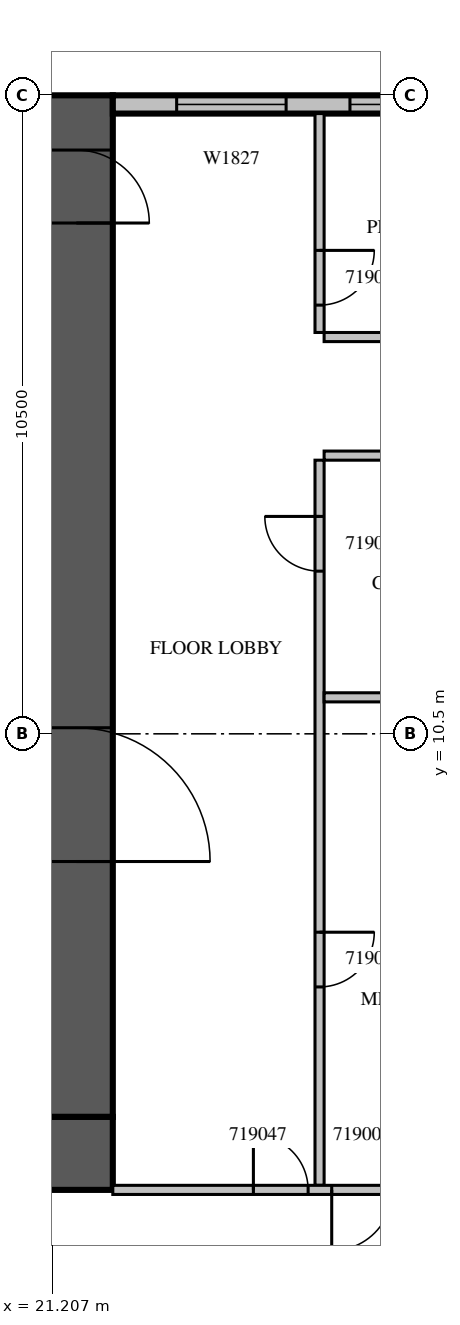
"""IFC4 building model, lengths in metres.
Left out: names, types, materials, properties, quantities, classifications, styles, units other than length and angle.
Written with IfcOpenShell. Run it as: python <this file> out.ifc"""

import sys

from ifc_helpers import new_model, si_unit, direction, frame, frame_2d, origin, place, context, subcontext, project, spatial, rectangle, extrude, source, transform, mapped, element, fill, save


model = new_model("IFC4")
c1 = context("Model", 3, precision=1e-05, world=origin(), true_north=direction((0.0, 1.0)))
c2 = subcontext(c1, "Body", "Model", "MODEL_VIEW")
j1 = project(units=[si_unit("LENGTHUNIT", "METRE"), si_unit("PLANEANGLEUNIT", "RADIAN")], contexts=[c1])
p1 = place(None, origin())
s1 = spatial("IfcSite", under=j1, at=p1, CompositionType="ELEMENT")
p2 = place(p1, origin())
s2 = spatial("IfcBuilding", under=s1, at=p2, CompositionType="ELEMENT")
p3 = place(p2, frame((0.0, 0.0, 90.9)))
s3 = spatial("IfcBuildingStorey", under=s2, at=p3, CompositionType="ELEMENT", Elevation=90.9)
m1 = source(origin(), c2, "Body", "SweptSolid", [
    extrude(rectangle(XDim=16.8, YDim=1.2, at=frame_2d((8.4, 0.0))), origin(), (0.0, 0.0, 1.0), 4.2),
])
p4 = place(p3, frame((21.6, 4.2, 0.0), z_axis=(0.0, 0.0, 1.0), x_axis=(0.0, 1.0, 0.0)))
e1 = element("IfcWall", 1, at=p4, inside=s3, PredefinedType="SHEAR", context=c2, shape_type="MappedRepresentation", body=[
    mapped(m1, transform((0.0, 0.0, 0.0), scale=1.0)),
])
m2 = source(origin(), c2, "Body", "SweptSolid", [
    extrude(rectangle(XDim=2.2, YDim=2.1, at=frame_2d((1.1, 1.05))), frame((0.0, 0.61, 0.0), z_axis=(0.0, -1.0, 0.0), x_axis=(1.0, 0.0, 0.0)), (0.0, 0.0, 1.0), 1.22),
])
p5 = place(p4, frame((4.2, 0.0, 0.0)))
e2 = element("IfcOpeningElement", 2, at=p5, cuts=e1, PredefinedType="OPENING", context=c2, shape_type="MappedRepresentation", body=[
    mapped(m2, transform((0.0, 0.0, 0.0), scale=1.0)),
])
m3 = source(origin(), c2, "Body", "SweptSolid", [
    extrude(rectangle(XDim=1.2, YDim=2.1, at=frame_2d((0.6, 1.05))), frame((0.0, 0.61, 0.0), z_axis=(0.0, -1.0, 0.0), x_axis=(1.0, 0.0, 0.0)), (0.0, 0.0, 1.0), 1.22),
])
p6 = place(p4, frame((14.7, 0.0, 0.0)))
e3 = element("IfcOpeningElement", 3, at=p6, cuts=e1, PredefinedType="OPENING", context=c2, shape_type="MappedRepresentation", body=[
    mapped(m3, transform((0.0, 0.0, 0.0), scale=1.0)),
])
m4 = source(origin(), c2, "Body", "SweptSolid", [
    extrude(rectangle(XDim=18.0, YDim=1.2, at=frame_2d((9.0, 0.0))), origin(), (0.0, 0.0, 1.0), 4.2),
])
p7 = place(p3, frame((4.2, 3.6, 0.0), z_axis=(0.0, 0.0, 1.0), x_axis=(1.0, 0.0, 0.0)))
e4 = element("IfcWall", 4, at=p7, inside=s3, PredefinedType="SHEAR", context=c2, shape_type="MappedRepresentation", body=[
    mapped(m4, transform((0.0, 0.0, 0.0), scale=1.0)),
])
m5 = source(origin(), c2, "Body", "SweptSolid", [
    extrude(rectangle(XDim=6.6, YDim=0.3, at=frame_2d((3.3, 0.0))), origin(), (0.0, 0.0, 1.0), 3.8),
])
p8 = place(p3, frame((28.8, 20.85, 0.0), z_axis=(0.0, 0.0, 1.0), x_axis=(-1.0, 0.0, 0.0)))
e5 = element("IfcWall", 5, at=p8, inside=s3, PredefinedType="STANDARD", context=c2, shape_type="MappedRepresentation", body=[
    mapped(m5, transform((0.0, 0.0, 0.0), scale=1.0)),
])
m6 = source(origin(), c2, "Body", "SweptSolid", [
    extrude(rectangle(XDim=2.4, YDim=2.7, at=frame_2d((1.2, 1.35))), frame((0.0, 0.16, 0.0), z_axis=(0.0, -1.0, 0.0), x_axis=(1.0, 0.0, 0.0)), (0.0, 0.0, 1.0), 0.32),
])
p9 = place(p8, frame((0.3, 0.0, 0.6)))
e6 = element("IfcOpeningElement", 6, at=p9, cuts=e5, PredefinedType="OPENING", context=c2, shape_type="MappedRepresentation", body=[
    mapped(m6, transform((0.0, 0.0, 0.0), scale=1.0)),
])
m7 = source(origin(), c2, "Body", "SweptSolid", [
    extrude(rectangle(XDim=1.8, YDim=2.7, at=frame_2d((0.9, 1.35))), frame((0.0, 0.16, 0.0), z_axis=(0.0, -1.0, 0.0), x_axis=(1.0, 0.0, 0.0)), (0.0, 0.0, 1.0), 0.32),
])
p10 = place(p8, frame((3.75, 0.0, 0.6)))
e7 = element("IfcOpeningElement", 7, at=p10, cuts=e5, PredefinedType="OPENING", context=c2, shape_type="MappedRepresentation", body=[
    mapped(m7, transform((0.0, 0.0, 0.0), scale=1.0)),
])
m8 = source(origin(), c2, "Body", "SweptSolid", [
    extrude(rectangle(XDim=11.925, YDim=0.15, at=frame_2d((5.963, 0.0))), origin(), (0.0, 0.0, 1.0), 3.8),
])
p11 = place(p3, frame((25.6, 15.0, 0.0), z_axis=(0.0, 0.0, 1.0), x_axis=(0.0, -1.0, 0.0)))
e8 = element("IfcWall", 8, at=p11, inside=s3, PredefinedType="PARTITIONING", context=c2, shape_type="MappedRepresentation", body=[
    mapped(m8, transform((0.0, 0.0, 0.0), scale=1.0)),
])
m9 = source(origin(), c2, "Body", "SweptSolid", [
    extrude(rectangle(XDim=0.9, YDim=2.1, at=frame_2d((0.45, 1.05))), frame((0.0, 0.085, 0.0), z_axis=(0.0, -1.0, 0.0), x_axis=(1.0, 0.0, 0.0)), (0.0, 0.0, 1.0), 0.17),
])
p12 = place(p11, frame((7.763, 0.0, 0.0)))
e9 = element("IfcOpeningElement", 9, at=p12, cuts=e8, PredefinedType="OPENING", context=c2, shape_type="MappedRepresentation", body=[
    mapped(m9, transform((0.0, 0.0, 0.0), scale=1.0)),
])
p13 = place(p11, frame((0.925, 0.0, 0.0)))
e10 = element("IfcOpeningElement", 10, at=p13, cuts=e8, PredefinedType="OPENING", context=c2, shape_type="MappedRepresentation", body=[
    mapped(m9, transform((0.0, 0.0, 0.0), scale=1.0)),
])
m10 = source(origin(), c2, "Body", "SweptSolid", [
    extrude(rectangle(XDim=3.6, YDim=0.15, at=frame_2d((1.8, 0.0))), origin(), (0.0, 0.0, 1.0), 3.8),
])
p14 = place(p3, frame((25.6, 20.7, 0.0), z_axis=(0.0, 0.0, 1.0), x_axis=(0.0, -1.0, 0.0)))
e11 = element("IfcWall", 11, at=p14, inside=s3, PredefinedType="PARTITIONING", context=c2, shape_type="MappedRepresentation", body=[
    mapped(m10, transform((0.0, 0.0, 0.0), scale=1.0)),
])
p15 = place(p14, frame((2.25, 0.0, 0.0)))
e12 = element("IfcOpeningElement", 12, at=p15, cuts=e11, PredefinedType="OPENING", context=c2, shape_type="MappedRepresentation", body=[
    mapped(m9, transform((0.0, 0.0, 0.0), scale=1.0)),
])
p16 = place(p3, frame((29.325, 11.1, 0.0), z_axis=(0.0, 0.0, 1.0), x_axis=(-1.0, 0.0, 0.0)))
e13 = element("IfcWall", 13, at=p16, inside=s3, PredefinedType="PARTITIONING", context=c2, shape_type="SweptSolid", body=[
    extrude(rectangle(XDim=3.65, YDim=0.15, at=frame_2d((1.825, 0.0))), origin(), (0.0, 0.0, 1.0), 3.8),
])
m11 = source(origin(), c2, "Body", "SweptSolid", [
    extrude(rectangle(XDim=3.65, YDim=0.15, at=frame_2d((1.825, 0.0))), origin(), (0.0, 0.0, 1.0), 3.8),
])
for number, where, z_axis, x_axis in (
    (14, (29.325, 15.075, 0.0), (0.0, 0.0, 1.0), (-1.0, 0.0, 0.0)),
    (15, (25.675, 17.025, 0.0), (0.0, 0.0, 1.0), (1.0, 0.0, 0.0)),
):
    element("IfcWall", number, at=place(p3, frame(where, z_axis=z_axis, x_axis=x_axis)), inside=s3, PredefinedType="PARTITIONING", context=c2, shape_type="MappedRepresentation", body=[
        mapped(m11, transform((0.0, 0.0, 0.0), scale=1.0)),
    ])
m12 = source(origin(), c2, "Body", "SweptSolid", [
    extrude(rectangle(XDim=7.125, YDim=0.15, at=frame_2d((3.562, 0.0))), origin(), (0.0, 0.0, 1.0), 3.8),
])
p17 = place(p3, frame((22.2, 3.0, 0.0), z_axis=(0.0, 0.0, 1.0), x_axis=(1.0, 0.0, 0.0)))
e16 = element("IfcWall", 16, at=p17, inside=s3, PredefinedType="PARTITIONING", context=c2, shape_type="MappedRepresentation", body=[
    mapped(m12, transform((0.0, 0.0, 0.0), scale=1.0)),
])
m13 = source(origin(), c2, "Body", "SweptSolid", [
    extrude(rectangle(XDim=1.0, YDim=2.1, at=frame_2d((0.5, 1.05))), frame((0.0, 0.085, 0.0), z_axis=(0.0, -1.0, 0.0), x_axis=(1.0, 0.0, 0.0)), (0.0, 0.0, 1.0), 0.17),
])
p18 = place(p17, frame((3.6, 0.0, 0.0)))
e17 = element("IfcOpeningElement", 17, at=p18, cuts=e16, PredefinedType="OPENING", context=c2, shape_type="MappedRepresentation", body=[
    mapped(m13, transform((0.0, 0.0, 0.0), scale=1.0)),
])
p19 = place(p17, frame((2.312, 0.0, 0.0)))
e18 = element("IfcOpeningElement", 18, at=p19, cuts=e16, PredefinedType="OPENING", context=c2, shape_type="MappedRepresentation", body=[
    mapped(m9, transform((0.0, 0.0, 0.0), scale=1.0)),
])
m14 = source(origin(), c2, "Body", "SweptSolid", [
    extrude(rectangle(XDim=2.4, YDim=2.7, at=frame_2d((1.2, 1.35))), frame((0.0, 0.03, 0.0), z_axis=(0.0, -1.0, 0.0), x_axis=(1.0, 0.0, 0.0)), (0.0, 0.0, 1.0), 0.06),
])
p20 = place(p9, origin())
e19 = element("IfcWindow", 19, at=p20, inside=s3, PartitioningType="SINGLE_PANEL", PredefinedType="WINDOW", context=c2, shape_type="MappedRepresentation", body=[
    mapped(m14, transform((0.0, 0.0, 0.0), scale=1.0)),
])
fill(e6, e19)
m15 = source(origin(), c2, "Body", "SweptSolid", [
    extrude(rectangle(XDim=1.8, YDim=2.7, at=frame_2d((0.9, 1.35))), frame((0.0, 0.03, 0.0), z_axis=(0.0, -1.0, 0.0), x_axis=(1.0, 0.0, 0.0)), (0.0, 0.0, 1.0), 0.06),
])
p21 = place(p10, origin())
e20 = element("IfcWindow", 20, at=p21, inside=s3, PartitioningType="SINGLE_PANEL", PredefinedType="WINDOW", context=c2, shape_type="MappedRepresentation", body=[
    mapped(m15, transform((0.0, 0.0, 0.0), scale=1.0)),
])
fill(e7, e20)
m16 = source(origin(), c2, "Body", "SweptSolid", [
    extrude(rectangle(XDim=2.2, YDim=2.1, at=frame_2d((1.1, 1.05))), frame((0.0, 0.025, 0.0), z_axis=(0.0, -1.0, 0.0), x_axis=(1.0, 0.0, 0.0)), (0.0, 0.0, 1.0), 0.05),
])
p22 = place(p5, origin())
e21 = element("IfcDoor", 21, at=p22, inside=s3, OperationType="DOUBLE_DOOR_SINGLE_SWING", PredefinedType="DOOR", context=c2, shape_type="MappedRepresentation", body=[
    mapped(m16, transform((0.0, 0.0, 0.0), scale=1.0)),
])
fill(e2, e21)
m17 = source(origin(), c2, "Body", "SweptSolid", [
    extrude(rectangle(XDim=1.2, YDim=2.1, at=frame_2d((0.6, 1.05))), frame((0.0, 0.025, 0.0), z_axis=(0.0, -1.0, 0.0), x_axis=(1.0, 0.0, 0.0)), (0.0, 0.0, 1.0), 0.05),
])
p23 = place(p6, origin())
e22 = element("IfcDoor", 22, at=p23, inside=s3, OperationType="SINGLE_SWING_RIGHT", PredefinedType="DOOR", context=c2, shape_type="MappedRepresentation", body=[
    mapped(m17, transform((0.0, 0.0, 0.0), scale=1.0)),
])
fill(e3, e22)
m18 = source(origin(), c2, "Body", "SweptSolid", [
    extrude(rectangle(XDim=0.9, YDim=2.1, at=frame_2d((0.45, 1.05))), frame((0.0, 0.025, 0.0), z_axis=(0.0, -1.0, 0.0), x_axis=(1.0, 0.0, 0.0)), (0.0, 0.0, 1.0), 0.05),
])
p24 = place(p12, origin())
e23 = element("IfcDoor", 23, at=p24, inside=s3, OperationType="SINGLE_SWING_LEFT", PredefinedType="DOOR", context=c2, shape_type="MappedRepresentation", body=[
    mapped(m18, transform((0.0, 0.0, 0.0), scale=1.0)),
])
fill(e9, e23)
p25 = place(p13, origin())
e24 = element("IfcDoor", 24, at=p25, inside=s3, OperationType="SINGLE_SWING_RIGHT", PredefinedType="DOOR", context=c2, shape_type="MappedRepresentation", body=[
    mapped(m18, transform((0.0, 0.0, 0.0), scale=1.0)),
])
fill(e10, e24)
p26 = place(p15, origin())
e25 = element("IfcDoor", 25, at=p26, inside=s3, OperationType="SINGLE_SWING_LEFT", PredefinedType="DOOR", context=c2, shape_type="MappedRepresentation", body=[
    mapped(m18, transform((0.0, 0.0, 0.0), scale=1.0)),
])
fill(e12, e25)
m19 = source(origin(), c2, "Body", "SweptSolid", [
    extrude(rectangle(XDim=1.0, YDim=2.1, at=frame_2d((0.5, 1.05))), frame((0.0, 0.025, 0.0), z_axis=(0.0, -1.0, 0.0), x_axis=(1.0, 0.0, 0.0)), (0.0, 0.0, 1.0), 0.05),
])
p27 = place(p18, origin())
e26 = element("IfcDoor", 26, at=p27, inside=s3, OperationType="SINGLE_SWING_RIGHT", PredefinedType="DOOR", context=c2, shape_type="MappedRepresentation", body=[
    mapped(m19, transform((0.0, 0.0, 0.0), scale=1.0)),
])
fill(e17, e26)
p28 = place(p19, origin())
e27 = element("IfcDoor", 27, at=p28, inside=s3, OperationType="SINGLE_SWING_LEFT", PredefinedType="DOOR", context=c2, shape_type="MappedRepresentation", body=[
    mapped(m18, transform((0.0, 0.0, 0.0), scale=1.0)),
])
fill(e18, e27)
save(model, sys.argv[1])
